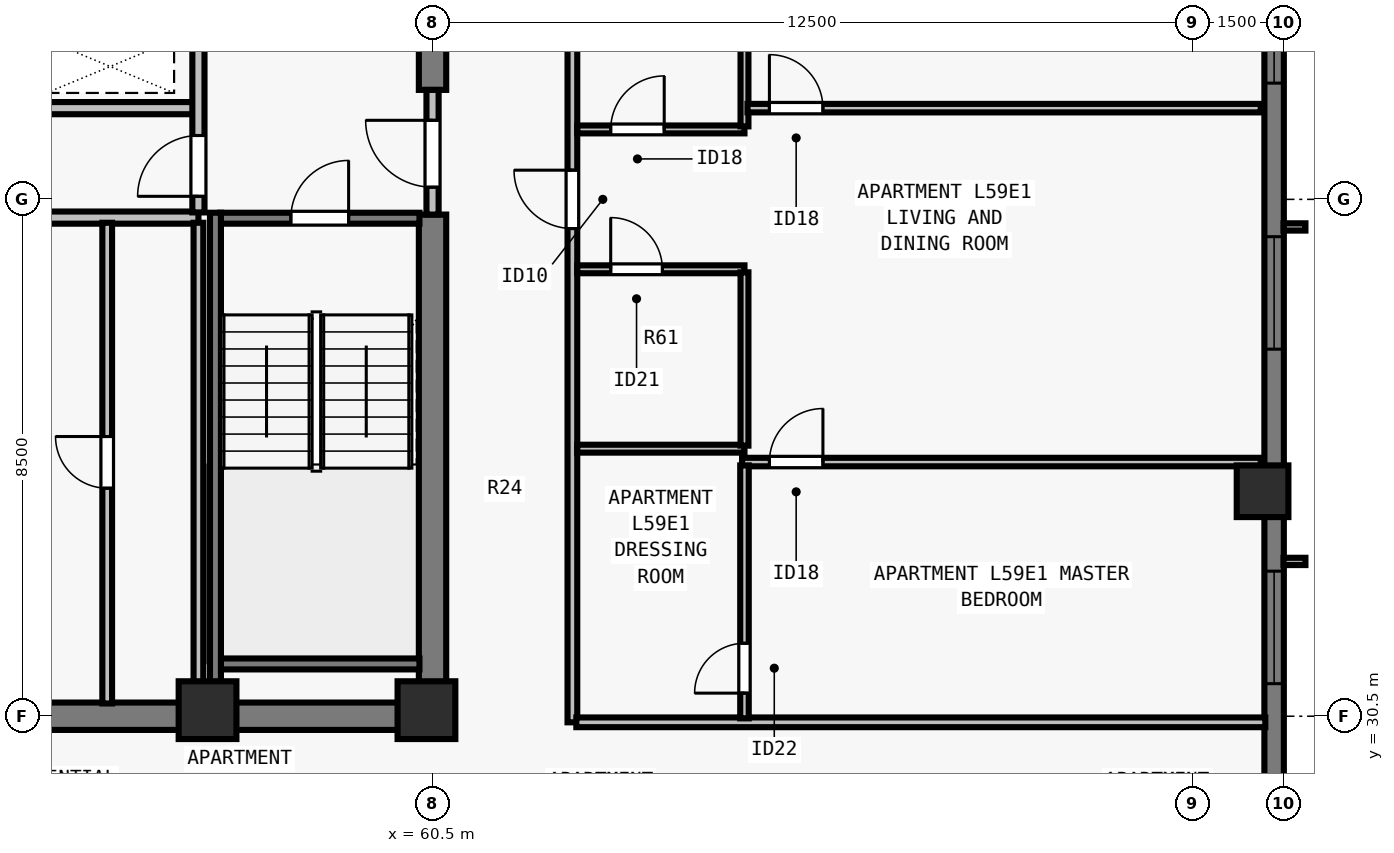
"""IFC4 building model, lengths in metres.
Left out: names, types, materials, properties, quantities, classifications, styles, units other than length and angle.
Written with IfcOpenShell. Run it as: python <this file> out.ifc"""

import sys

from ifc_helpers import new_model, si_unit, direction, frame, frame_2d, origin, origin_2d, place, context, subcontext, project, spatial, rectangle, extrude, element, fill, save


model = new_model("IFC4")
c1 = context("Model", 3, precision=1e-05, world=origin(), true_north=direction((0.0, 1.0)))
c2 = subcontext(c1, "Body", "Model", "MODEL_VIEW")
j1 = project(units=[si_unit("LENGTHUNIT", "METRE"), si_unit("PLANEANGLEUNIT", "RADIAN")], contexts=[c1])
p1 = place(None, origin())
s1 = spatial("IfcSite", under=j1, at=p1, CompositionType="ELEMENT")
p2 = place(p1, origin())
s2 = spatial("IfcBuilding", under=s1, at=p2, CompositionType="ELEMENT")
p3 = place(p2, frame((0.0, 0.0, 216.5)))
s3 = spatial("IfcBuildingStorey", under=s2, at=p3, CompositionType="ELEMENT", Elevation=216.5)
for number, where, z_axis, x_axis in (
    (1, (56.8, 30.6, 0.0), (0.0, 0.0, 1.0), (1.0, 0.0, 0.0)),
    (2, (60.4, 30.6, 0.0), (0.0, 0.0, 1.0), (1.0, 0.0, 0.0)),
):
    element("IfcColumn", number, at=place(p3, frame(where, z_axis=z_axis, x_axis=x_axis)), inside=s3, PredefinedType="COLUMN", context=c2, shape_type="SweptSolid", body=[
        extrude(rectangle(XDim=0.95, YDim=0.95, at=origin_2d()), origin(), (0.0, 0.0, 1.0), 3.5),
    ])
p4 = place(p3, frame((74.15, 34.2, 0.0), z_axis=(0.0, 0.0, 1.0), x_axis=(0.0, 1.0, 0.0)))
e3 = element("IfcColumn", 3, at=p4, inside=s3, PredefinedType="COLUMN", context=c2, shape_type="SweptSolid", body=[
    extrude(rectangle(XDim=0.85, YDim=0.85, at=origin_2d()), origin(), (0.0, 0.0, 1.0), 3.5),
])
p5 = place(p3, frame((74.34, 56.5, 0.0), z_axis=(0.0, 0.0, 1.0), x_axis=(0.0, -1.0, 0.0)))
e4 = element("IfcWall", 4, at=p5, inside=s3, PredefinedType="SOLIDWALL", context=c2, shape_type="SweptSolid", body=[
    extrude(rectangle(XDim=34.702, YDim=0.32, at=frame_2d((17.351, 0.0))), origin(), (0.0, 0.0, 1.0), 3.29),
])
p6 = place(p5, frame((6.888, 0.0, 0.8)))
e5 = element("IfcOpeningElement", 5, at=p6, cuts=e4, PredefinedType="OPENING", context=c2, shape_type="SweptSolid", body=[
    extrude(rectangle(XDim=1.55, YDim=1.678, at=frame_2d((0.775, 0.839))), frame((0.0, 0.17, 0.0), z_axis=(0.0, -1.0, 0.0), x_axis=(1.0, 0.0, 0.0)), (0.0, 0.0, 1.0), 0.34),
])
p7 = place(p5, frame((10.113, 0.0, 0.8)))
e6 = element("IfcOpeningElement", 6, at=p7, cuts=e4, PredefinedType="OPENING", context=c2, shape_type="SweptSolid", body=[
    extrude(rectangle(XDim=1.85, YDim=1.678, at=frame_2d((0.925, 0.839))), frame((0.0, 0.17, 0.0), z_axis=(0.0, -1.0, 0.0), x_axis=(1.0, 0.0, 0.0)), (0.0, 0.0, 1.0), 0.34),
])
p8 = place(p5, frame((14.038, 0.0, 0.8)))
e7 = element("IfcOpeningElement", 7, at=p8, cuts=e4, PredefinedType="OPENING", context=c2, shape_type="SweptSolid", body=[
    extrude(rectangle(XDim=1.55, YDim=1.678, at=frame_2d((0.775, 0.839))), frame((0.0, 0.17, 0.0), z_axis=(0.0, -1.0, 0.0), x_axis=(1.0, 0.0, 0.0)), (0.0, 0.0, 1.0), 0.34),
])
p9 = place(p5, frame((18.114, 0.0, 0.8)))
e8 = element("IfcOpeningElement", 8, at=p9, cuts=e4, PredefinedType="OPENING", context=c2, shape_type="SweptSolid", body=[
    extrude(rectangle(XDim=1.85, YDim=1.678, at=frame_2d((0.925, 0.839))), frame((0.0, 0.17, 0.0), z_axis=(0.0, -1.0, 0.0), x_axis=(1.0, 0.0, 0.0)), (0.0, 0.0, 1.0), 0.34),
])
p10 = place(p5, frame((23.614, 0.0, 0.8)))
e9 = element("IfcOpeningElement", 9, at=p10, cuts=e4, PredefinedType="OPENING", context=c2, shape_type="SweptSolid", body=[
    extrude(rectangle(XDim=1.85, YDim=1.678, at=frame_2d((0.925, 0.839))), frame((0.0, 0.17, 0.0), z_axis=(0.0, -1.0, 0.0), x_axis=(1.0, 0.0, 0.0)), (0.0, 0.0, 1.0), 0.34),
])
p11 = place(p5, frame((29.24, 0.0, 0.8)))
e10 = element("IfcOpeningElement", 10, at=p11, cuts=e4, PredefinedType="OPENING", context=c2, shape_type="SweptSolid", body=[
    extrude(rectangle(XDim=1.55, YDim=1.678, at=frame_2d((0.775, 0.839))), frame((0.0, 0.17, 0.0), z_axis=(0.0, -1.0, 0.0), x_axis=(1.0, 0.0, 0.0)), (0.0, 0.0, 1.0), 0.34),
])
p12 = place(p3, frame((43.275, 30.5, 0.0), z_axis=(0.0, 0.0, 1.0), x_axis=(1.0, 0.0, 0.0)))
e11 = element("IfcWall", 11, at=p12, inside=s3, PredefinedType="SHEAR", context=c2, shape_type="SweptSolid", body=[
    extrude(rectangle(XDim=17.45, YDim=0.45, at=frame_2d((8.725, 0.0))), origin(), (0.0, 0.0, 1.0), 3.29),
])
p13 = place(p3, frame((60.5, 30.715, 0.0), z_axis=(0.0, 0.0, 1.0), x_axis=(0.0, 1.0, 0.0)))
e12 = element("IfcWall", 12, at=p13, inside=s3, PredefinedType="SHEAR", context=c2, shape_type="SweptSolid", body=[
    extrude(rectangle(XDim=8.035, YDim=0.45, at=frame_2d((4.018, 0.0))), origin(), (0.0, 0.0, 1.0), 3.29),
])
p14 = place(p3, frame((60.5, 40.8, 0.0), z_axis=(0.0, 0.0, 1.0), x_axis=(0.0, 1.0, 0.0)))
e13 = element("IfcWall", 13, at=p14, inside=s3, PredefinedType="SHEAR", context=c2, shape_type="SweptSolid", body=[
    extrude(rectangle(XDim=6.485, YDim=0.45, at=frame_2d((3.242, 0.0))), origin(), (0.0, 0.0, 1.0), 3.29),
])
for number, where, z_axis, x_axis in (
    (14, (53.7, 38.7, 0.0), (0.0, 0.0, 1.0), (1.0, 0.0, 0.0)),
    (15, (53.7, 40.5, 0.0), (0.0, 0.0, 1.0), (1.0, 0.0, 0.0)),
):
    element("IfcWall", number, at=place(p3, frame(where, z_axis=z_axis, x_axis=x_axis)), inside=s3, PredefinedType="SOLIDWALL", context=c2, shape_type="SweptSolid", body=[
        extrude(rectangle(XDim=2.95, YDim=0.2, at=frame_2d((1.475, 0.0))), origin(), (0.0, 0.0, 1.0), 3.29),
    ])
p15 = place(p3, frame((60.5, 38.75, 0.0), z_axis=(0.0, 0.0, 1.0), x_axis=(0.0, 1.0, 0.0)))
e16 = element("IfcWall", 16, at=p15, inside=s3, PredefinedType="SOLIDWALL", context=c2, shape_type="SweptSolid", body=[
    extrude(rectangle(XDim=2.05, YDim=0.2, at=frame_2d((1.025, 0.0))), origin(), (0.0, 0.0, 1.0), 3.29),
])
p16 = place(p15, frame((0.45, 0.0, 0.0)))
e17 = element("IfcOpeningElement", 17, at=p16, cuts=e16, PredefinedType="OPENING", context=c2, shape_type="SweptSolid", body=[
    extrude(rectangle(XDim=1.1, YDim=2.15, at=frame_2d((0.55, 1.075))), frame((0.0, 0.11, 0.0), z_axis=(0.0, -1.0, 0.0), x_axis=(1.0, 0.0, 0.0)), (0.0, 0.0, 1.0), 0.22),
])
p17 = place(p3, frame((56.65, 38.785, 0.0), z_axis=(0.0, 0.0, 1.0), x_axis=(0.0, 1.0, 0.0)))
e18 = element("IfcWall", 18, at=p17, inside=s3, PredefinedType="SOLIDWALL", context=c2, shape_type="SweptSolid", body=[
    extrude(rectangle(XDim=4.865, YDim=0.2, at=frame_2d((2.433, 0.0))), origin(), (0.0, 0.0, 1.0), 3.29),
])
p18 = place(p17, frame((0.265, 0.0, 0.0)))
e19 = element("IfcOpeningElement", 19, at=p18, cuts=e18, PredefinedType="OPENING", context=c2, shape_type="SweptSolid", body=[
    extrude(rectangle(XDim=1.0, YDim=2.15, at=frame_2d((0.5, 1.075))), frame((0.0, 0.11, 0.0), z_axis=(0.0, -1.0, 0.0), x_axis=(1.0, 0.0, 0.0)), (0.0, 0.0, 1.0), 0.22),
])
p19 = place(p3, frame((56.65, 30.71, 0.0), z_axis=(0.0, 0.0, 1.0), x_axis=(0.0, 1.0, 0.0)))
e20 = element("IfcWall", 20, at=p19, inside=s3, PredefinedType="PARTITIONING", context=c2, shape_type="SweptSolid", body=[
    extrude(rectangle(XDim=7.905, YDim=0.16, at=frame_2d((3.953, 0.0))), origin(), (0.0, 0.0, 1.0), 3.29),
])
p20 = place(p3, frame((55.15, 30.71, 0.0), z_axis=(0.0, 0.0, 1.0), x_axis=(0.0, 1.0, 0.0)))
e21 = element("IfcWall", 21, at=p20, inside=s3, PredefinedType="PARTITIONING", context=c2, shape_type="SweptSolid", body=[
    extrude(rectangle(XDim=7.905, YDim=0.16, at=frame_2d((3.953, 0.0))), origin(), (0.0, 0.0, 1.0), 3.29),
])
p21 = place(p20, frame((3.54, 0.0, 0.0)))
e22 = element("IfcOpeningElement", 22, at=p21, cuts=e21, PredefinedType="OPENING", context=c2, shape_type="SweptSolid", body=[
    extrude(rectangle(XDim=0.85, YDim=2.12, at=frame_2d((0.425, 1.06))), frame((0.0, 0.09, 0.0), z_axis=(0.0, -1.0, 0.0), x_axis=(1.0, 0.0, 0.0)), (0.0, 0.0, 1.0), 0.18),
])
p22 = place(p3, frame((62.8, 30.4, 0.0), z_axis=(0.0, 0.0, 1.0), x_axis=(0.0, 1.0, 0.0)))
e23 = element("IfcWall", 23, at=p22, inside=s3, PredefinedType="PARTITIONING", context=c2, shape_type="SweptSolid", body=[
    extrude(rectangle(XDim=17.2, YDim=0.16, at=frame_2d((8.6, 0.0))), origin(), (0.0, 0.0, 1.0), 3.29),
])
p23 = place(p22, frame((8.12, 0.0, 0.0)))
e24 = element("IfcOpeningElement", 24, at=p23, cuts=e23, PredefinedType="OPENING", context=c2, shape_type="SweptSolid", body=[
    extrude(rectangle(XDim=0.96, YDim=2.18, at=frame_2d((0.48, 1.09))), frame((0.0, 0.09, 0.0), z_axis=(0.0, -1.0, 0.0), x_axis=(1.0, 0.0, 0.0)), (0.0, 0.0, 1.0), 0.18),
])
p24 = place(p3, frame((62.865, 30.4, 0.0), z_axis=(0.0, 0.0, 1.0), x_axis=(1.0, 0.0, 0.0)))
e25 = element("IfcWall", 25, at=p24, inside=s3, PredefinedType="PARTITIONING", context=c2, shape_type="SweptSolid", body=[
    extrude(rectangle(XDim=11.33, YDim=0.16, at=frame_2d((5.665, 0.0))), origin(), (0.0, 0.0, 1.0), 3.29),
])
p25 = place(p3, frame((62.88, 34.9, 0.0), z_axis=(0.0, 0.0, 1.0), x_axis=(1.0, 0.0, 0.0)))
e26 = element("IfcWall", 26, at=p25, inside=s3, PredefinedType="PLUMBINGWALL", context=c2, shape_type="SweptSolid", body=[
    extrude(rectangle(XDim=2.75, YDim=0.13, at=frame_2d((1.375, 0.0))), origin(), (0.0, 0.0, 1.0), 3.29),
])
p26 = place(p3, frame((62.88, 37.85, 0.0), z_axis=(0.0, 0.0, 1.0), x_axis=(1.0, 0.0, 0.0)))
e27 = element("IfcWall", 27, at=p26, inside=s3, PredefinedType="PLUMBINGWALL", context=c2, shape_type="SweptSolid", body=[
    extrude(rectangle(XDim=2.75, YDim=0.13, at=frame_2d((1.375, 0.0))), origin(), (0.0, 0.0, 1.0), 3.29),
])
p27 = place(p26, frame((0.55, 0.0, 0.0)))
e28 = element("IfcOpeningElement", 28, at=p27, cuts=e27, PredefinedType="OPENING", context=c2, shape_type="SweptSolid", body=[
    extrude(rectangle(XDim=0.85, YDim=2.08, at=frame_2d((0.425, 1.04))), frame((0.0, 0.075, 0.0), z_axis=(0.0, -1.0, 0.0), x_axis=(1.0, 0.0, 0.0)), (0.0, 0.0, 1.0), 0.15),
])
p28 = place(p3, frame((65.63, 34.95, 0.0), z_axis=(0.0, 0.0, 1.0), x_axis=(0.0, 1.0, 0.0)))
e29 = element("IfcWall", 29, at=p28, inside=s3, PredefinedType="PLUMBINGWALL", context=c2, shape_type="SweptSolid", body=[
    extrude(rectangle(XDim=2.85, YDim=0.13, at=frame_2d((1.425, 0.0))), origin(), (0.0, 0.0, 1.0), 3.29),
])
p29 = place(p3, frame((62.88, 40.15, 0.0), z_axis=(0.0, 0.0, 1.0), x_axis=(1.0, 0.0, 0.0)))
e30 = element("IfcWall", 30, at=p29, inside=s3, PredefinedType="PLUMBINGWALL", context=c2, shape_type="SweptSolid", body=[
    extrude(rectangle(XDim=2.75, YDim=0.13, at=frame_2d((1.375, 0.0))), origin(), (0.0, 0.0, 1.0), 3.29),
])
p30 = place(p29, frame((0.55, 0.0, 0.0)))
e31 = element("IfcOpeningElement", 31, at=p30, cuts=e30, PredefinedType="OPENING", context=c2, shape_type="SweptSolid", body=[
    extrude(rectangle(XDim=0.88, YDim=2.1, at=frame_2d((0.44, 1.05))), frame((0.0, 0.075, 0.0), z_axis=(0.0, -1.0, 0.0), x_axis=(1.0, 0.0, 0.0)), (0.0, 0.0, 1.0), 0.15),
])
p31 = place(p3, frame((65.63, 40.2, 0.0), z_axis=(0.0, 0.0, 1.0), x_axis=(0.0, 1.0, 0.0)))
e32 = element("IfcWall", 32, at=p31, inside=s3, PredefinedType="PLUMBINGWALL", context=c2, shape_type="SweptSolid", body=[
    extrude(rectangle(XDim=3.15, YDim=0.13, at=frame_2d((1.575, 0.0))), origin(), (0.0, 0.0, 1.0), 3.29),
])
p32 = place(p3, frame((65.59, 34.68, 0.0), z_axis=(0.0, 0.0, 1.0), x_axis=(1.0, 0.0, 0.0)))
e33 = element("IfcWall", 33, at=p32, inside=s3, PredefinedType="PARTITIONING", context=c2, shape_type="SweptSolid", body=[
    extrude(rectangle(XDim=8.53, YDim=0.14, at=frame_2d((4.265, 0.0))), origin(), (0.0, 0.0, 1.0), 3.29),
])
p33 = place(p32, frame((0.45, 0.0, 0.0)))
e34 = element("IfcOpeningElement", 34, at=p33, cuts=e33, PredefinedType="OPENING", context=c2, shape_type="SweptSolid", body=[
    extrude(rectangle(XDim=0.88, YDim=2.1, at=frame_2d((0.44, 1.05))), frame((0.0, 0.08, 0.0), z_axis=(0.0, -1.0, 0.0), x_axis=(1.0, 0.0, 0.0)), (0.0, 0.0, 1.0), 0.16),
])
p34 = place(p3, frame((65.63, 30.465, 0.0), z_axis=(0.0, 0.0, 1.0), x_axis=(0.0, 1.0, 0.0)))
e35 = element("IfcWall", 35, at=p34, inside=s3, PredefinedType="PARTITIONING", context=c2, shape_type="SweptSolid", body=[
    extrude(rectangle(XDim=4.16, YDim=0.14, at=frame_2d((2.08, 0.0))), origin(), (0.0, 0.0, 1.0), 3.29),
])
p35 = place(p34, frame((0.415, 0.0, 0.0)))
e36 = element("IfcOpeningElement", 36, at=p35, cuts=e35, PredefinedType="OPENING", context=c2, shape_type="SweptSolid", body=[
    extrude(rectangle(XDim=0.82, YDim=2.1, at=frame_2d((0.41, 1.05))), frame((0.0, 0.08, 0.0), z_axis=(0.0, -1.0, 0.0), x_axis=(1.0, 0.0, 0.0)), (0.0, 0.0, 1.0), 0.16),
])
p36 = place(p3, frame((65.68, 40.5, 0.0), z_axis=(0.0, 0.0, 1.0), x_axis=(1.0, 0.0, 0.0)))
e37 = element("IfcWall", 37, at=p36, inside=s3, PredefinedType="PARTITIONING", context=c2, shape_type="SweptSolid", body=[
    extrude(rectangle(XDim=8.44, YDim=0.14, at=frame_2d((4.22, 0.0))), origin(), (0.0, 0.0, 1.0), 3.29),
])
p37 = place(p36, frame((0.36, 0.0, 0.0)))
e38 = element("IfcOpeningElement", 38, at=p37, cuts=e37, PredefinedType="OPENING", context=c2, shape_type="SweptSolid", body=[
    extrude(rectangle(XDim=0.88, YDim=2.1, at=frame_2d((0.44, 1.05))), frame((0.0, 0.08, 0.0), z_axis=(0.0, -1.0, 0.0), x_axis=(1.0, 0.0, 0.0)), (0.0, 0.0, 1.0), 0.16),
])
p38 = place(p3, frame((57.005, 38.69, 0.0), z_axis=(0.0, 0.0, 1.0), x_axis=(1.0, 0.0, 0.0)))
e39 = element("IfcWall", 39, at=p38, inside=s3, PredefinedType="SOLIDWALL", context=c2, shape_type="SweptSolid", body=[
    extrude(rectangle(XDim=3.28, YDim=0.18, at=frame_2d((1.64, 0.0))), origin(), (0.0, 0.0, 1.0), 3.29),
])
p39 = place(p38, frame((1.165, 0.0, 0.0)))
e40 = element("IfcOpeningElement", 40, at=p39, cuts=e39, PredefinedType="OPENING", context=c2, shape_type="SweptSolid", body=[
    extrude(rectangle(XDim=0.95, YDim=2.15, at=frame_2d((0.475, 1.075))), frame((0.0, 0.1, 0.0), z_axis=(0.0, -1.0, 0.0), x_axis=(1.0, 0.0, 0.0)), (0.0, 0.0, 1.0), 0.2),
])
p40 = place(p3, frame((57.005, 31.36, 0.0), z_axis=(0.0, 0.0, 1.0), x_axis=(1.0, 0.0, 0.0)))
e41 = element("IfcWall", 41, at=p40, inside=s3, PredefinedType="SOLIDWALL", context=c2, shape_type="SweptSolid", body=[
    extrude(rectangle(XDim=3.28, YDim=0.18, at=frame_2d((1.64, 0.0))), origin(), (0.0, 0.0, 1.0), 3.29),
])
p41 = place(p3, frame((56.93, 38.78, 0.0), z_axis=(0.0, 0.0, 1.0), x_axis=(0.0, -1.0, 0.0)))
e42 = element("IfcWall", 42, at=p41, inside=s3, PredefinedType="SOLIDWALL", context=c2, shape_type="SweptSolid", body=[
    extrude(rectangle(XDim=8.067, YDim=0.18, at=frame_2d((4.034, 0.0))), origin(), (0.0, 0.0, 1.0), 3.29),
])
p42 = place(p8, origin())
e43 = element("IfcWindow", 43, at=p42, inside=s3, PartitioningType="SINGLE_PANEL", PredefinedType="WINDOW", context=c2, shape_type="SweptSolid", body=[
    extrude(rectangle(XDim=1.55, YDim=1.678, at=frame_2d((0.775, 0.839))), frame((0.0, -0.05, 0.0), z_axis=(0.0, -1.0, 0.0), x_axis=(1.0, 0.0, 0.0)), (0.0, 0.0, 1.0), 0.06),
])
fill(e7, e43)
p43 = place(p9, origin())
e44 = element("IfcWindow", 44, at=p43, inside=s3, PartitioningType="SINGLE_PANEL", PredefinedType="WINDOW", context=c2, shape_type="SweptSolid", body=[
    extrude(rectangle(XDim=1.85, YDim=1.678, at=frame_2d((0.925, 0.839))), frame((0.0, -0.05, 0.0), z_axis=(0.0, -1.0, 0.0), x_axis=(1.0, 0.0, 0.0)), (0.0, 0.0, 1.0), 0.06),
])
fill(e8, e44)
p44 = place(p10, origin())
e45 = element("IfcWindow", 45, at=p44, inside=s3, PartitioningType="SINGLE_PANEL", PredefinedType="WINDOW", context=c2, shape_type="SweptSolid", body=[
    extrude(rectangle(XDim=1.85, YDim=1.678, at=frame_2d((0.925, 0.839))), frame((0.0, -0.05, 0.0), z_axis=(0.0, -1.0, 0.0), x_axis=(1.0, 0.0, 0.0)), (0.0, 0.0, 1.0), 0.06),
])
fill(e9, e45)
p45 = place(p16, origin())
e46 = element("IfcDoor", 46, at=p45, inside=s3, OperationType="SINGLE_SWING_RIGHT", PredefinedType="DOOR", context=c2, shape_type="SweptSolid", body=[
    extrude(rectangle(XDim=1.1, YDim=2.15, at=frame_2d((0.55, 1.075))), frame((0.0, 0.025, 0.0), z_axis=(0.0, -1.0, 0.0), x_axis=(1.0, 0.0, 0.0)), (0.0, 0.0, 1.0), 0.05),
])
fill(e17, e46)
p46 = place(p18, origin())
e47 = element("IfcDoor", 47, at=p46, inside=s3, OperationType="SINGLE_SWING_LEFT", PredefinedType="DOOR", context=c2, shape_type="SweptSolid", body=[
    extrude(rectangle(XDim=1.0, YDim=2.15, at=frame_2d((0.5, 1.075))), frame((0.0, 0.025, 0.0), z_axis=(0.0, -1.0, 0.0), x_axis=(1.0, 0.0, 0.0)), (0.0, 0.0, 1.0), 0.05),
])
fill(e19, e47)
p47 = place(p21, origin())
e48 = element("IfcDoor", 48, at=p47, inside=s3, OperationType="SINGLE_SWING_RIGHT", PredefinedType="DOOR", context=c2, shape_type="SweptSolid", body=[
    extrude(rectangle(XDim=0.85, YDim=2.12, at=frame_2d((0.425, 1.06))), frame((0.0, 0.025, 0.0), z_axis=(0.0, -1.0, 0.0), x_axis=(1.0, 0.0, 0.0)), (0.0, 0.0, 1.0), 0.05),
])
fill(e22, e48)
p48 = place(p27, origin())
e49 = element("IfcDoor", 49, at=p48, inside=s3, OperationType="SINGLE_SWING_LEFT", PredefinedType="DOOR", context=c2, shape_type="SweptSolid", body=[
    extrude(rectangle(XDim=0.85, YDim=2.08, at=frame_2d((0.425, 1.04))), frame((0.0, 0.025, 0.0), z_axis=(0.0, -1.0, 0.0), x_axis=(1.0, 0.0, 0.0)), (0.0, 0.0, 1.0), 0.05),
])
fill(e28, e49)
p49 = place(p30, origin())
e50 = element("IfcDoor", 50, at=p49, inside=s3, OperationType="SINGLE_SWING_RIGHT", PredefinedType="DOOR", context=c2, shape_type="SweptSolid", body=[
    extrude(rectangle(XDim=0.88, YDim=2.1, at=frame_2d((0.44, 1.05))), frame((0.0, 0.025, 0.0), z_axis=(0.0, -1.0, 0.0), x_axis=(1.0, 0.0, 0.0)), (0.0, 0.0, 1.0), 0.05),
])
fill(e31, e50)
p50 = place(p35, origin())
e51 = element("IfcDoor", 51, at=p50, inside=s3, OperationType="SINGLE_SWING_LEFT", PredefinedType="DOOR", context=c2, shape_type="SweptSolid", body=[
    extrude(rectangle(XDim=0.82, YDim=2.1, at=frame_2d((0.41, 1.05))), frame((0.0, 0.025, 0.0), z_axis=(0.0, -1.0, 0.0), x_axis=(1.0, 0.0, 0.0)), (0.0, 0.0, 1.0), 0.05),
])
fill(e36, e51)
p51 = place(p33, origin())
e52 = element("IfcDoor", 52, at=p51, inside=s3, OperationType="SINGLE_SWING_RIGHT", PredefinedType="DOOR", context=c2, shape_type="SweptSolid", body=[
    extrude(rectangle(XDim=0.88, YDim=2.1, at=frame_2d((0.44, 1.05))), frame((0.0, 0.025, 0.0), z_axis=(0.0, -1.0, 0.0), x_axis=(1.0, 0.0, 0.0)), (0.0, 0.0, 1.0), 0.05),
])
fill(e34, e52)
p52 = place(p37, origin())
e53 = element("IfcDoor", 53, at=p52, inside=s3, OperationType="SINGLE_SWING_LEFT", PredefinedType="DOOR", context=c2, shape_type="SweptSolid", body=[
    extrude(rectangle(XDim=0.88, YDim=2.1, at=frame_2d((0.44, 1.05))), frame((0.0, 0.025, 0.0), z_axis=(0.0, -1.0, 0.0), x_axis=(1.0, 0.0, 0.0)), (0.0, 0.0, 1.0), 0.05),
])
fill(e38, e53)
p53 = place(p23, origin())
e54 = element("IfcDoor", 54, at=p53, inside=s3, OperationType="SINGLE_SWING_RIGHT", PredefinedType="DOOR", context=c2, shape_type="SweptSolid", body=[
    extrude(rectangle(XDim=0.96, YDim=2.18, at=frame_2d((0.48, 1.09))), frame((0.0, 0.025, 0.0), z_axis=(0.0, -1.0, 0.0), x_axis=(1.0, 0.0, 0.0)), (0.0, 0.0, 1.0), 0.05),
])
fill(e24, e54)
p54 = place(p39, origin())
e55 = element("IfcDoor", 55, at=p54, inside=s3, OperationType="SINGLE_SWING_RIGHT", PredefinedType="DOOR", context=c2, shape_type="SweptSolid", body=[
    extrude(rectangle(XDim=0.95, YDim=2.15, at=frame_2d((0.475, 1.075))), frame((0.0, 0.025, 0.0), z_axis=(0.0, -1.0, 0.0), x_axis=(1.0, 0.0, 0.0)), (0.0, 0.0, 1.0), 0.05),
])
fill(e40, e55)
save(model, sys.argv[1])
